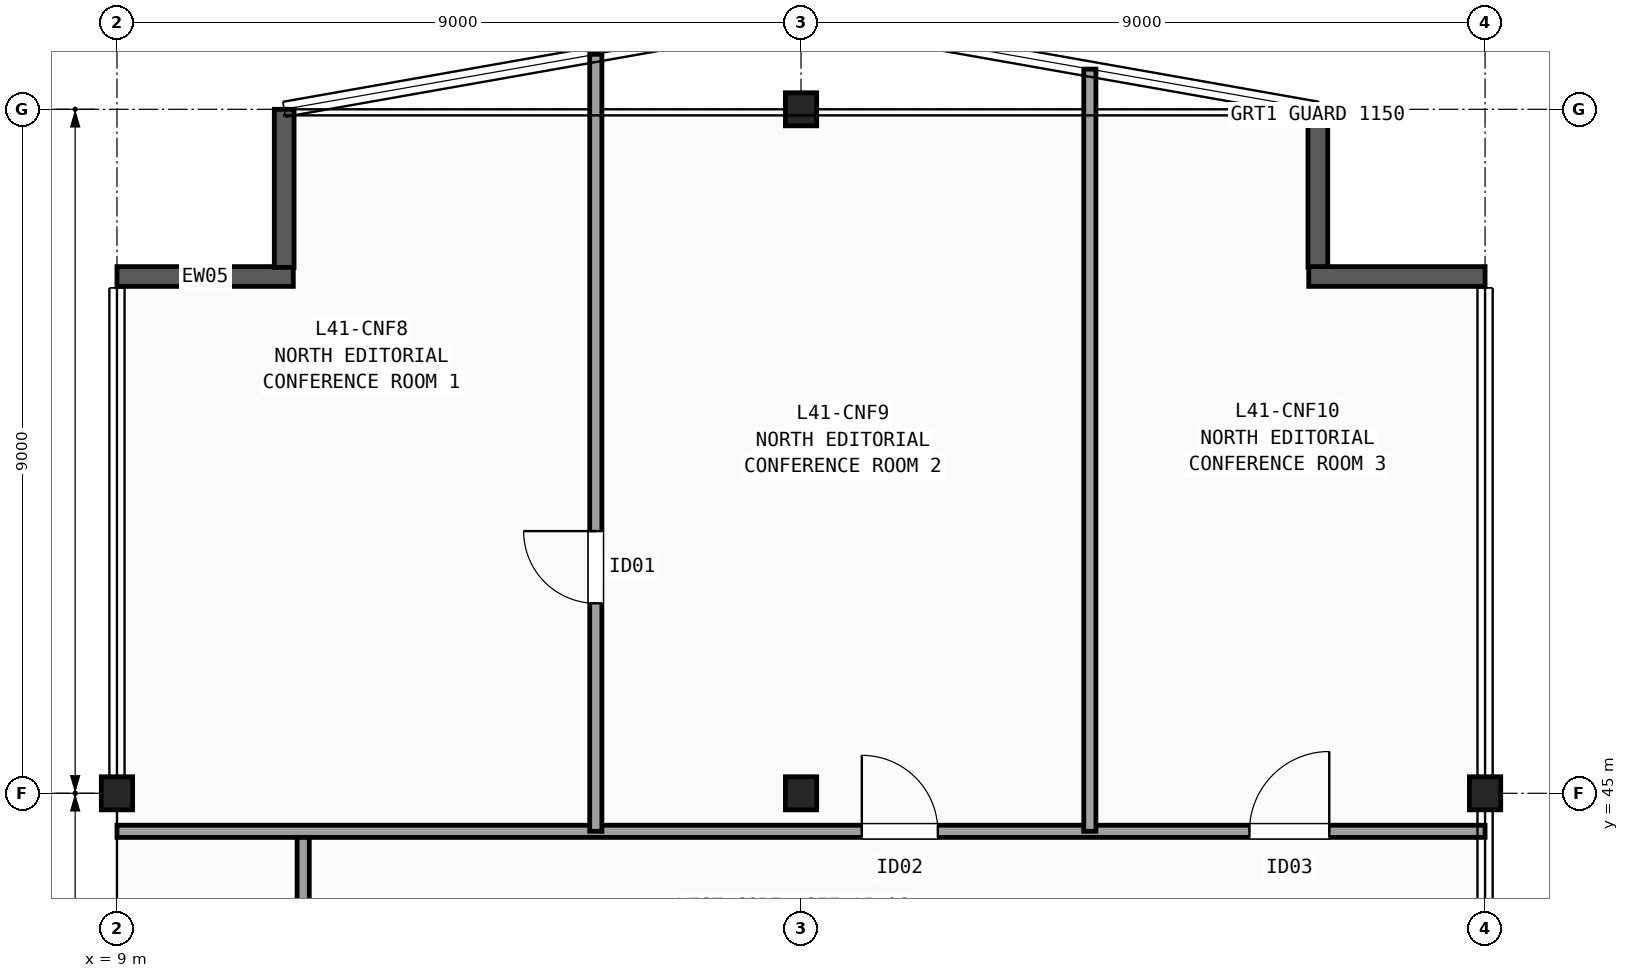
"""IFC4 building model, lengths in metres.
Left out: names, types, materials, properties, quantities, classifications, styles, units other than length and angle.
Written with IfcOpenShell. Run it as: python <this file> out.ifc"""

import sys

from ifc_helpers import new_model, si_unit, direction, frame, frame_2d, origin, origin_2d, place, context, subcontext, project, spatial, rectangle, i_section, extrude, element, fill, save


model = new_model("IFC4")
c1 = context("Model", 3, precision=1e-05, world=origin(), true_north=direction((0.0, 1.0)))
c2 = subcontext(c1, "Body", "Model", "MODEL_VIEW")
j1 = project(units=[si_unit("LENGTHUNIT", "METRE"), si_unit("PLANEANGLEUNIT", "RADIAN")], contexts=[c1])
p1 = place(None, origin())
s1 = spatial("IfcSite", under=j1, at=p1, CompositionType="ELEMENT")
p2 = place(p1, origin())
s2 = spatial("IfcBuilding", under=s1, at=p2, CompositionType="ELEMENT")
p3 = place(p2, frame((0.0, 0.0, 165.5)))
s3 = spatial("IfcBuildingStorey", under=s2, at=p3, CompositionType="ELEMENT", Elevation=165.5)
for number, where, z_axis, x_axis in (
    (1, (9.0, 45.0, 0.0), (0.0, 0.0, 1.0), (1.0, 0.0, 0.0)),
    (2, (18.0, 45.0, 0.0), (0.0, 0.0, 1.0), (1.0, 0.0, 0.0)),
    (3, (18.0, 54.0, 0.0), (0.0, 0.0, 1.0), (1.0, 0.0, 0.0)),
    (4, (27.0, 45.0, 0.0), (0.0, 0.0, 1.0), (1.0, 0.0, 0.0)),
):
    element("IfcColumn", number, at=place(p3, frame(where, z_axis=z_axis, x_axis=x_axis)), inside=s3, PredefinedType="COLUMN", context=c2, shape_type="SweptSolid", body=[
        extrude(i_section(OverallWidth=0.412, OverallDepth=0.435, WebThickness=0.036, FlangeThickness=0.057, FilletRadius=0.015, at=origin_2d()), origin(), (0.0, 0.0, 1.0), 3.7),
    ])
p4 = place(p3, frame((9.0, 51.8, 0.0), z_axis=(0.0, 0.0, 1.0), x_axis=(1.0, 0.0, 0.0)))
e5 = element("IfcWall", 5, at=p4, inside=s3, PredefinedType="SOLIDWALL", context=c2, shape_type="SweptSolid", body=[
    extrude(rectangle(XDim=2.32, YDim=0.26, at=frame_2d((1.16, 0.0))), origin(), (0.0, 0.0, 1.0), 3.37),
])
for number, where, z_axis, x_axis in (
    (6, (11.2, 51.92, 0.0), (0.0, 0.0, 1.0), (0.0, 1.0, 0.0)),
    (7, (24.8, 54.0, 0.0), (0.0, 0.0, 1.0), (0.0, -1.0, 0.0)),
):
    element("IfcWall", number, at=place(p3, frame(where, z_axis=z_axis, x_axis=x_axis)), inside=s3, PredefinedType="SOLIDWALL", context=c2, shape_type="SweptSolid", body=[
        extrude(rectangle(XDim=2.08, YDim=0.26, at=frame_2d((1.04, 0.0))), origin(), (0.0, 0.0, 1.0), 3.37),
    ])
p5 = place(p3, frame((24.68, 51.8, 0.0), z_axis=(0.0, 0.0, 1.0), x_axis=(1.0, 0.0, 0.0)))
e8 = element("IfcWall", 8, at=p5, inside=s3, PredefinedType="SOLIDWALL", context=c2, shape_type="SweptSolid", body=[
    extrude(rectangle(XDim=2.32, YDim=0.26, at=frame_2d((1.16, 0.0))), origin(), (0.0, 0.0, 1.0), 3.37),
])
p6 = place(p3, frame((11.45, 42.4, 0.0), z_axis=(0.0, 0.0, 1.0), x_axis=(0.0, 1.0, 0.0)))
e9 = element("IfcWall", 9, at=p6, inside=s3, PredefinedType="PARTITIONING", context=c2, shape_type="SweptSolid", body=[
    extrude(rectangle(XDim=2.1, YDim=0.16, at=frame_2d((1.05, 0.0))), origin(), (0.0, 0.0, 1.0), 3.37),
])
p7 = place(p3, frame((9.0, 44.5, 0.0), z_axis=(0.0, 0.0, 1.0), x_axis=(1.0, 0.0, 0.0)))
e10 = element("IfcWall", 10, at=p7, inside=s3, PredefinedType="PARTITIONING", context=c2, shape_type="SweptSolid", body=[
    extrude(rectangle(XDim=18.0, YDim=0.16, at=frame_2d((9.0, 0.0))), origin(), (0.0, 0.0, 1.0), 2.584),
])
p8 = place(p7, frame((9.8, 0.0, 0.0)))
e11 = element("IfcOpeningElement", 11, at=p8, cuts=e10, PredefinedType="OPENING", context=c2, shape_type="SweptSolid", body=[
    extrude(rectangle(XDim=1.0, YDim=2.1, at=frame_2d((0.5, 1.05))), frame((0.0, 0.09, 0.0), z_axis=(0.0, -1.0, 0.0), x_axis=(1.0, 0.0, 0.0)), (0.0, 0.0, 1.0), 0.18),
])
p9 = place(p7, frame((14.9, 0.0, 0.0)))
e12 = element("IfcOpeningElement", 12, at=p9, cuts=e10, PredefinedType="OPENING", context=c2, shape_type="SweptSolid", body=[
    extrude(rectangle(XDim=1.05, YDim=2.15, at=frame_2d((0.525, 1.075))), frame((0.0, 0.09, 0.0), z_axis=(0.0, -1.0, 0.0), x_axis=(1.0, 0.0, 0.0)), (0.0, 0.0, 1.0), 0.18),
])
p10 = place(p3, frame((15.3, 44.5, 0.0), z_axis=(0.0, 0.0, 1.0), x_axis=(0.0, 1.0, 0.0)))
e13 = element("IfcWall", 13, at=p10, inside=s3, PredefinedType="PARTITIONING", context=c2, shape_type="SweptSolid", body=[
    extrude(rectangle(XDim=10.224, YDim=0.16, at=frame_2d((5.112, 0.0))), origin(), (0.0, 0.0, 1.0), 2.739),
])
p11 = place(p10, frame((3.0, 0.0, 0.0)))
e14 = element("IfcOpeningElement", 14, at=p11, cuts=e13, PredefinedType="OPENING", context=c2, shape_type="SweptSolid", body=[
    extrude(rectangle(XDim=0.95, YDim=2.1, at=frame_2d((0.475, 1.05))), frame((0.0, 0.09, 0.0), z_axis=(0.0, -1.0, 0.0), x_axis=(1.0, 0.0, 0.0)), (0.0, 0.0, 1.0), 0.18),
])
p12 = place(p3, frame((21.8, 44.5, 0.0), z_axis=(0.0, 0.0, 1.0), x_axis=(0.0, 1.0, 0.0)))
e15 = element("IfcWall", 15, at=p12, inside=s3, PredefinedType="PARTITIONING", context=c2, shape_type="SweptSolid", body=[
    extrude(rectangle(XDim=10.029, YDim=0.16, at=frame_2d((5.015, 0.0))), origin(), (0.0, 0.0, 1.0), 2.739),
])
p13 = place(p11, origin())
e16 = element("IfcDoor", 16, at=p13, inside=s3, OperationType="SINGLE_SWING_RIGHT", PredefinedType="DOOR", context=c2, shape_type="SweptSolid", body=[
    extrude(rectangle(XDim=0.95, YDim=2.1, at=frame_2d((0.475, 1.05))), frame((0.0, 0.025, 0.0), z_axis=(0.0, -1.0, 0.0), x_axis=(1.0, 0.0, 0.0)), (0.0, 0.0, 1.0), 0.05),
])
fill(e14, e16)
p14 = place(p8, origin())
e17 = element("IfcDoor", 17, at=p14, inside=s3, OperationType="SINGLE_SWING_LEFT", PredefinedType="DOOR", context=c2, shape_type="SweptSolid", body=[
    extrude(rectangle(XDim=1.0, YDim=2.1, at=frame_2d((0.5, 1.05))), frame((0.0, 0.025, 0.0), z_axis=(0.0, -1.0, 0.0), x_axis=(1.0, 0.0, 0.0)), (0.0, 0.0, 1.0), 0.05),
])
fill(e11, e17)
p15 = place(p9, origin())
e18 = element("IfcDoor", 18, at=p15, inside=s3, OperationType="SINGLE_SWING_RIGHT", PredefinedType="DOOR", context=c2, shape_type="SweptSolid", body=[
    extrude(rectangle(XDim=1.05, YDim=2.15, at=frame_2d((0.525, 1.075))), frame((0.0, 0.025, 0.0), z_axis=(0.0, -1.0, 0.0), x_axis=(1.0, 0.0, 0.0)), (0.0, 0.0, 1.0), 0.05),
])
fill(e12, e18)
save(model, sys.argv[1])
